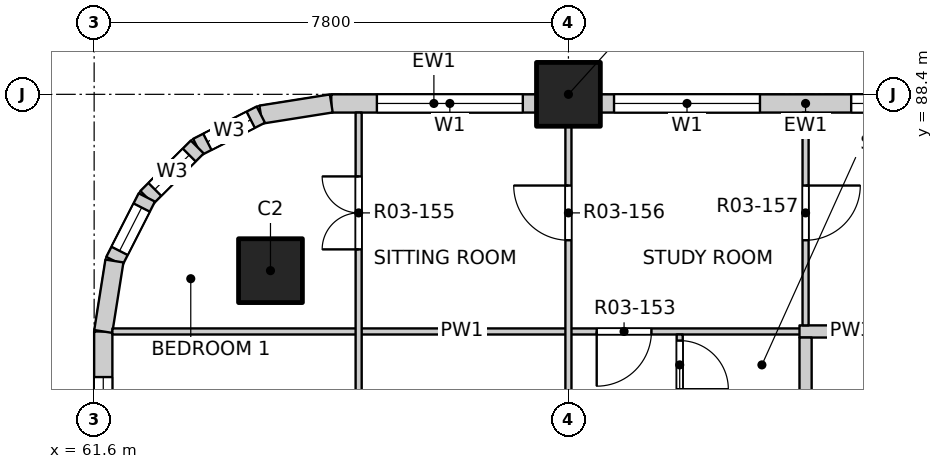
"""IFC4 building model, lengths in metres.
Left out: names, types, materials, properties, quantities, classifications, styles, units other than length and angle.
Written with IfcOpenShell. Run it as: python <this file> out.ifc"""

import sys

from ifc_helpers import new_model, si_unit, direction, frame, frame_2d, origin, origin_2d, place, context, subcontext, project, spatial, rectangle, extrude, element, fill, save


model = new_model("IFC4")
c1 = context("Model", 3, precision=1e-05, world=origin(), true_north=direction((0.0, 1.0)))
c2 = subcontext(c1, "Body", "Model", "MODEL_VIEW")
j1 = project(units=[si_unit("LENGTHUNIT", "METRE"), si_unit("PLANEANGLEUNIT", "RADIAN")], contexts=[c1])
p1 = place(None, origin())
s1 = spatial("IfcSite", under=j1, at=p1, CompositionType="ELEMENT")
p2 = place(p1, origin())
s2 = spatial("IfcBuilding", under=s1, at=p2, CompositionType="ELEMENT")
p3 = place(p2, frame((0.0, 0.0, 39.9)))
s3 = spatial("IfcBuildingStorey", under=s2, at=p3, CompositionType="ELEMENT", Elevation=39.9)
for number, where, z_axis, x_axis in (
    (1, (64.5, 85.5, -0.25), (0.0, 0.0, 1.0), (1.0, 0.0, 0.0)),
    (2, (69.4, 88.4, -0.25), (0.0, 0.0, 1.0), (1.0, 0.0, 0.0)),
):
    element("IfcColumn", number, at=place(p3, frame(where, z_axis=z_axis, x_axis=x_axis)), inside=s3, PredefinedType="COLUMN", context=c2, shape_type="SweptSolid", body=[
        extrude(rectangle(XDim=1.05, YDim=1.05, at=origin_2d()), origin(), (0.0, 0.0, 1.0), 3.4),
    ])
p4 = place(p3, frame((65.5, 88.25, 0.0), z_axis=(0.0, 0.0, 1.0), x_axis=(1.0, 0.0, 0.0)))
e3 = element("IfcWall", 3, at=p4, inside=s3, PredefinedType="SOLIDWALL", context=c2, shape_type="SweptSolid", body=[
    extrude(rectangle(XDim=3.375, YDim=0.3, at=frame_2d((1.688, 0.0))), origin(), (0.0, 0.0, 1.0), 2.7),
])
p5 = place(p4, frame((0.75, 0.0, 0.9)))
e4 = element("IfcOpeningElement", 4, at=p5, cuts=e3, PredefinedType="OPENING", context=c2, shape_type="SweptSolid", body=[
    extrude(rectangle(XDim=2.4, YDim=1.8, at=frame_2d((1.2, 0.9))), frame((0.0, 0.16, 0.0), z_axis=(0.0, -1.0, 0.0), x_axis=(1.0, 0.0, 0.0)), (0.0, 0.0, 1.0), 0.32),
])
p6 = place(p3, frame((69.925, 88.25, 0.0), z_axis=(0.0, 0.0, 1.0), x_axis=(1.0, 0.0, 0.0)))
e5 = element("IfcWall", 5, at=p6, inside=s3, PredefinedType="SOLIDWALL", context=c2, shape_type="SweptSolid", body=[
    extrude(rectangle(XDim=6.75, YDim=0.3, at=frame_2d((3.375, 0.0))), origin(), (0.0, 0.0, 1.0), 2.7),
])
p7 = place(p6, frame((0.225, 0.0, 0.9)))
e6 = element("IfcOpeningElement", 6, at=p7, cuts=e5, PredefinedType="OPENING", context=c2, shape_type="SweptSolid", body=[
    extrude(rectangle(XDim=2.4, YDim=1.8, at=frame_2d((1.2, 0.9))), frame((0.0, 0.16, 0.0), z_axis=(0.0, -1.0, 0.0), x_axis=(1.0, 0.0, 0.0)), (0.0, 0.0, 1.0), 0.32),
])
p8 = place(p6, frame((4.125, 0.0, 0.9)))
e7 = element("IfcOpeningElement", 7, at=p8, cuts=e5, PredefinedType="OPENING", context=c2, shape_type="SweptSolid", body=[
    extrude(rectangle(XDim=2.4, YDim=1.8, at=frame_2d((1.2, 0.9))), frame((0.0, 0.16, 0.0), z_axis=(0.0, -1.0, 0.0), x_axis=(1.0, 0.0, 0.0)), (0.0, 0.0, 1.0), 0.32),
])
p9 = place(p3, frame((61.75, 81.125, 0.0), z_axis=(0.0, 0.0, 1.0), x_axis=(0.0, 1.0, 0.0)))
e8 = element("IfcWall", 8, at=p9, inside=s3, PredefinedType="SOLIDWALL", context=c2, shape_type="SweptSolid", body=[
    extrude(rectangle(XDim=3.375, YDim=0.3, at=frame_2d((1.688, 0.0))), origin(), (0.0, 0.0, 1.0), 2.7),
])
p10 = place(p9, frame((0.225, 0.0, 0.9)))
e9 = element("IfcOpeningElement", 9, at=p10, cuts=e8, PredefinedType="OPENING", context=c2, shape_type="SweptSolid", body=[
    extrude(rectangle(XDim=2.4, YDim=1.8, at=frame_2d((1.2, 0.9))), frame((0.0, 0.16, 0.0), z_axis=(0.0, -1.0, 0.0), x_axis=(1.0, 0.0, 0.0)), (0.0, 0.0, 1.0), 0.32),
])
p11 = place(p3, frame((65.5, 88.25, 0.0), z_axis=(0.0, 0.0, 1.0), x_axis=(-0.987678452879, -0.156496880861, 0.0)))
e10 = element("IfcWall", 10, at=p11, inside=s3, PredefinedType="SOLIDWALL", context=c2, shape_type="SweptSolid", body=[
    extrude(rectangle(XDim=1.173, YDim=0.3, at=frame_2d((0.586, 0.0))), origin(), (0.0, 0.0, 1.0), 2.7),
])
p12 = place(p3, frame((64.341, 88.066, 0.0), z_axis=(0.0, 0.0, 1.0), x_axis=(-0.890988677504, -0.454025524128, 0.0)))
e11 = element("IfcWall", 11, at=p12, inside=s3, PredefinedType="SOLIDWALL", context=c2, shape_type="SweptSolid", body=[
    extrude(rectangle(XDim=1.173, YDim=0.3, at=frame_2d((0.587, 0.0))), origin(), (0.0, 0.0, 1.0), 2.7),
])
p13 = place(p12, frame((0.187, 0.0, 0.9)))
e12 = element("IfcOpeningElement", 12, at=p13, cuts=e11, PredefinedType="OPENING", context=c2, shape_type="SweptSolid", body=[
    extrude(rectangle(XDim=0.8, YDim=1.2, at=frame_2d((0.4, 0.6))), frame((0.0, 0.16, 0.0), z_axis=(0.0, -1.0, 0.0), x_axis=(1.0, 0.0, 0.0)), (0.0, 0.0, 1.0), 0.32),
])
p14 = place(p3, frame((63.296, 87.534, 0.0), z_axis=(0.0, 0.0, 1.0), x_axis=(-0.707106781187, -0.707106781187, 0.0)))
e13 = element("IfcWall", 13, at=p14, inside=s3, PredefinedType="SOLIDWALL", context=c2, shape_type="SweptSolid", body=[
    extrude(rectangle(XDim=1.173, YDim=0.3, at=frame_2d((0.586, 0.0))), origin(), (0.0, 0.0, 1.0), 2.7),
])
p15 = place(p14, frame((0.187, 0.0, 0.9)))
e14 = element("IfcOpeningElement", 14, at=p15, cuts=e13, PredefinedType="OPENING", context=c2, shape_type="SweptSolid", body=[
    extrude(rectangle(XDim=0.8, YDim=1.2, at=frame_2d((0.4, 0.6))), frame((0.0, 0.16, 0.0), z_axis=(0.0, -1.0, 0.0), x_axis=(1.0, 0.0, 0.0)), (0.0, 0.0, 1.0), 0.32),
])
p16 = place(p3, frame((62.466, 86.704, 0.0), z_axis=(0.0, 0.0, 1.0), x_axis=(-0.454025524128, -0.890988677504, 0.0)))
e15 = element("IfcWall", 15, at=p16, inside=s3, PredefinedType="SOLIDWALL", context=c2, shape_type="SweptSolid", body=[
    extrude(rectangle(XDim=1.173, YDim=0.3, at=frame_2d((0.587, 0.0))), origin(), (0.0, 0.0, 1.0), 2.7),
])
p17 = place(p16, frame((0.187, 0.0, 0.9)))
e16 = element("IfcOpeningElement", 16, at=p17, cuts=e15, PredefinedType="OPENING", context=c2, shape_type="SweptSolid", body=[
    extrude(rectangle(XDim=0.8, YDim=1.2, at=frame_2d((0.4, 0.6))), frame((0.0, 0.16, 0.0), z_axis=(0.0, -1.0, 0.0), x_axis=(1.0, 0.0, 0.0)), (0.0, 0.0, 1.0), 0.32),
])
p18 = place(p3, frame((61.934, 85.659, 0.0), z_axis=(0.0, 0.0, 1.0), x_axis=(-0.156496880861, -0.987678452879, 0.0)))
e17 = element("IfcWall", 17, at=p18, inside=s3, PredefinedType="SOLIDWALL", context=c2, shape_type="SweptSolid", body=[
    extrude(rectangle(XDim=1.173, YDim=0.3, at=frame_2d((0.586, 0.0))), origin(), (0.0, 0.0, 1.0), 2.7),
])
p19 = place(p3, frame((61.9, 84.5, 0.0), z_axis=(0.0, 0.0, 1.0), x_axis=(1.0, 0.0, 0.0)))
e18 = element("IfcWall", 18, at=p19, inside=s3, PredefinedType="PARTITIONING", context=c2, shape_type="SweptSolid", body=[
    extrude(rectangle(XDim=11.5, YDim=0.1, at=frame_2d((5.75, 0.0))), origin(), (0.0, 0.0, 1.0), 3.15),
])
p20 = place(p19, frame((7.965, 0.0, 0.0)))
e19 = element("IfcOpeningElement", 19, at=p20, cuts=e18, PredefinedType="OPENING", context=c2, shape_type="SweptSolid", body=[
    extrude(rectangle(XDim=0.9, YDim=2.1, at=frame_2d((0.45, 1.05))), frame((0.0, 0.06, 0.0), z_axis=(0.0, -1.0, 0.0), x_axis=(1.0, 0.0, 0.0)), (0.0, 0.0, 1.0), 0.12),
])
p21 = place(p3, frame((73.2, 84.5, 0.0), z_axis=(0.0, 0.0, 1.0), x_axis=(1.0, 0.0, 0.0)))
e20 = element("IfcWall", 20, at=p21, inside=s3, PredefinedType="PARTITIONING", context=c2, shape_type="SweptSolid", body=[
    extrude(rectangle(XDim=1.7, YDim=0.2, at=frame_2d((0.85, 0.0))), origin(), (0.0, 0.0, 1.0), 3.15),
])
p22 = place(p3, frame((65.95, 76.8, 0.0), z_axis=(0.0, 0.0, 1.0), x_axis=(0.0, 1.0, 0.0)))
e21 = element("IfcWall", 21, at=p22, inside=s3, PredefinedType="PARTITIONING", context=c2, shape_type="SweptSolid", body=[
    extrude(rectangle(XDim=11.3, YDim=0.1, at=frame_2d((5.65, 0.0))), origin(), (0.0, 0.0, 1.0), 3.15),
])
p23 = place(p22, frame((1.25, 0.0, 0.0)))
e22 = element("IfcOpeningElement", 22, at=p23, cuts=e21, PredefinedType="OPENING", context=c2, shape_type="SweptSolid", body=[
    extrude(rectangle(XDim=1.2, YDim=2.1, at=frame_2d((0.6, 1.05))), frame((0.0, 0.06, 0.0), z_axis=(0.0, -1.0, 0.0), x_axis=(1.0, 0.0, 0.0)), (0.0, 0.0, 1.0), 0.12),
])
p24 = place(p22, frame((5.15, 0.0, 0.0)))
e23 = element("IfcOpeningElement", 23, at=p24, cuts=e21, PredefinedType="OPENING", context=c2, shape_type="SweptSolid", body=[
    extrude(rectangle(XDim=1.2, YDim=2.1, at=frame_2d((0.6, 1.05))), frame((0.0, 0.06, 0.0), z_axis=(0.0, -1.0, 0.0), x_axis=(1.0, 0.0, 0.0)), (0.0, 0.0, 1.0), 0.12),
])
p25 = place(p22, frame((9.05, 0.0, 0.0)))
e24 = element("IfcOpeningElement", 24, at=p25, cuts=e21, PredefinedType="OPENING", context=c2, shape_type="SweptSolid", body=[
    extrude(rectangle(XDim=1.2, YDim=2.1, at=frame_2d((0.6, 1.05))), frame((0.0, 0.06, 0.0), z_axis=(0.0, -1.0, 0.0), x_axis=(1.0, 0.0, 0.0)), (0.0, 0.0, 1.0), 0.12),
])
p26 = place(p3, frame((69.4, 41.9, 0.0), z_axis=(0.0, 0.0, 1.0), x_axis=(0.0, 1.0, 0.0)))
e25 = element("IfcWall", 25, at=p26, inside=s3, PredefinedType="PARTITIONING", context=c2, shape_type="SweptSolid", body=[
    extrude(rectangle(XDim=46.2, YDim=0.1, at=frame_2d((23.1, 0.0))), origin(), (0.0, 0.0, 1.0), 3.15),
])
p27 = place(p26, frame((1.2, 0.0, 0.0)))
e26 = element("IfcOpeningElement", 26, at=p27, cuts=e25, PredefinedType="OPENING", context=c2, shape_type="SweptSolid", body=[
    extrude(rectangle(XDim=0.9, YDim=2.1, at=frame_2d((0.45, 1.05))), frame((0.0, 0.06, 0.0), z_axis=(0.0, -1.0, 0.0), x_axis=(1.0, 0.0, 0.0)), (0.0, 0.0, 1.0), 0.12),
])
p28 = place(p26, frame((5.9, 0.0, 0.0)))
e27 = element("IfcOpeningElement", 27, at=p28, cuts=e25, PredefinedType="OPENING", context=c2, shape_type="SweptSolid", body=[
    extrude(rectangle(XDim=0.9, YDim=2.1, at=frame_2d((0.45, 1.05))), frame((0.0, 0.06, 0.0), z_axis=(0.0, -1.0, 0.0), x_axis=(1.0, 0.0, 0.0)), (0.0, 0.0, 1.0), 0.12),
])
p29 = place(p26, frame((9.0, 0.0, 0.0)))
e28 = element("IfcOpeningElement", 28, at=p29, cuts=e25, PredefinedType="OPENING", context=c2, shape_type="SweptSolid", body=[
    extrude(rectangle(XDim=0.9, YDim=2.1, at=frame_2d((0.45, 1.05))), frame((0.0, 0.06, 0.0), z_axis=(0.0, -1.0, 0.0), x_axis=(1.0, 0.0, 0.0)), (0.0, 0.0, 1.0), 0.12),
])
p30 = place(p26, frame((13.725, 0.0, 0.0)))
e29 = element("IfcOpeningElement", 29, at=p30, cuts=e25, PredefinedType="OPENING", context=c2, shape_type="SweptSolid", body=[
    extrude(rectangle(XDim=0.9, YDim=2.1, at=frame_2d((0.45, 1.05))), frame((0.0, 0.06, 0.0), z_axis=(0.0, -1.0, 0.0), x_axis=(1.0, 0.0, 0.0)), (0.0, 0.0, 1.0), 0.12),
])
p31 = place(p26, frame((17.775, 0.0, 0.0)))
e30 = element("IfcOpeningElement", 30, at=p31, cuts=e25, PredefinedType="OPENING", context=c2, shape_type="SweptSolid", body=[
    extrude(rectangle(XDim=0.9, YDim=2.1, at=frame_2d((0.45, 1.05))), frame((0.0, 0.06, 0.0), z_axis=(0.0, -1.0, 0.0), x_axis=(1.0, 0.0, 0.0)), (0.0, 0.0, 1.0), 0.12),
])
p32 = place(p26, frame((20.7, 0.0, 0.0)))
e31 = element("IfcOpeningElement", 31, at=p32, cuts=e25, PredefinedType="OPENING", context=c2, shape_type="SweptSolid", body=[
    extrude(rectangle(XDim=0.9, YDim=2.1, at=frame_2d((0.45, 1.05))), frame((0.0, 0.06, 0.0), z_axis=(0.0, -1.0, 0.0), x_axis=(1.0, 0.0, 0.0)), (0.0, 0.0, 1.0), 0.12),
])
p33 = place(p26, frame((25.575, 0.0, 0.0)))
e32 = element("IfcOpeningElement", 32, at=p33, cuts=e25, PredefinedType="OPENING", context=c2, shape_type="SweptSolid", body=[
    extrude(rectangle(XDim=0.9, YDim=2.1, at=frame_2d((0.45, 1.05))), frame((0.0, 0.06, 0.0), z_axis=(0.0, -1.0, 0.0), x_axis=(1.0, 0.0, 0.0)), (0.0, 0.0, 1.0), 0.12),
])
p34 = place(p26, frame((28.5, 0.0, 0.0)))
e33 = element("IfcOpeningElement", 33, at=p34, cuts=e25, PredefinedType="OPENING", context=c2, shape_type="SweptSolid", body=[
    extrude(rectangle(XDim=0.9, YDim=2.1, at=frame_2d((0.45, 1.05))), frame((0.0, 0.06, 0.0), z_axis=(0.0, -1.0, 0.0), x_axis=(1.0, 0.0, 0.0)), (0.0, 0.0, 1.0), 0.12),
])
p35 = place(p26, frame((33.375, 0.0, 0.0)))
e34 = element("IfcOpeningElement", 34, at=p35, cuts=e25, PredefinedType="OPENING", context=c2, shape_type="SweptSolid", body=[
    extrude(rectangle(XDim=0.9, YDim=2.1, at=frame_2d((0.45, 1.05))), frame((0.0, 0.06, 0.0), z_axis=(0.0, -1.0, 0.0), x_axis=(1.0, 0.0, 0.0)), (0.0, 0.0, 1.0), 0.12),
])
p36 = place(p26, frame((36.3, 0.0, 0.0)))
e35 = element("IfcOpeningElement", 35, at=p36, cuts=e25, PredefinedType="OPENING", context=c2, shape_type="SweptSolid", body=[
    extrude(rectangle(XDim=0.9, YDim=2.1, at=frame_2d((0.45, 1.05))), frame((0.0, 0.06, 0.0), z_axis=(0.0, -1.0, 0.0), x_axis=(1.0, 0.0, 0.0)), (0.0, 0.0, 1.0), 0.12),
])
p37 = place(p26, frame((40.2, 0.0, 0.0)))
e36 = element("IfcOpeningElement", 36, at=p37, cuts=e25, PredefinedType="OPENING", context=c2, shape_type="SweptSolid", body=[
    extrude(rectangle(XDim=0.9, YDim=2.1, at=frame_2d((0.45, 1.05))), frame((0.0, 0.06, 0.0), z_axis=(0.0, -1.0, 0.0), x_axis=(1.0, 0.0, 0.0)), (0.0, 0.0, 1.0), 0.12),
])
p38 = place(p26, frame((44.1, 0.0, 0.0)))
e37 = element("IfcOpeningElement", 37, at=p38, cuts=e25, PredefinedType="OPENING", context=c2, shape_type="SweptSolid", body=[
    extrude(rectangle(XDim=0.9, YDim=2.1, at=frame_2d((0.45, 1.05))), frame((0.0, 0.06, 0.0), z_axis=(0.0, -1.0, 0.0), x_axis=(1.0, 0.0, 0.0)), (0.0, 0.0, 1.0), 0.12),
])
p39 = place(p3, frame((71.23, 83.45, 0.0), z_axis=(0.0, 0.0, 1.0), x_axis=(0.0, 1.0, 0.0)))
e38 = element("IfcWall", 38, at=p39, inside=s3, PredefinedType="PARTITIONING", context=c2, shape_type="SweptSolid", body=[
    extrude(rectangle(XDim=1.0, YDim=0.1, at=frame_2d((0.5, 0.0))), origin(), (0.0, 0.0, 1.0), 3.15),
])
p40 = place(p39, frame((0.1, 0.0, 0.0)))
e39 = element("IfcOpeningElement", 39, at=p40, cuts=e38, PredefinedType="OPENING", context=c2, shape_type="SweptSolid", body=[
    extrude(rectangle(XDim=0.8, YDim=2.1, at=frame_2d((0.4, 1.05))), frame((0.0, 0.06, 0.0), z_axis=(0.0, -1.0, 0.0), x_axis=(1.0, 0.0, 0.0)), (0.0, 0.0, 1.0), 0.12),
])
p41 = place(p3, frame((73.3, 53.4, 0.0), z_axis=(0.0, 0.0, 1.0), x_axis=(0.0, 1.0, 0.0)))
e40 = element("IfcWall", 40, at=p41, inside=s3, PredefinedType="PARTITIONING", context=c2, shape_type="SweptSolid", body=[
    extrude(rectangle(XDim=31.0, YDim=0.2, at=frame_2d((15.5, 0.0))), origin(), (0.0, 0.0, 1.0), 3.15),
])
p42 = place(p41, frame((5.775, 0.0, 0.0)))
e41 = element("IfcOpeningElement", 41, at=p42, cuts=e40, PredefinedType="OPENING", context=c2, shape_type="SweptSolid", body=[
    extrude(rectangle(XDim=1.0, YDim=2.1, at=frame_2d((0.5, 1.05))), frame((0.0, 0.11, 0.0), z_axis=(0.0, -1.0, 0.0), x_axis=(1.0, 0.0, 0.0)), (0.0, 0.0, 1.0), 0.22),
])
p43 = place(p41, frame((10.875, 0.0, 0.0)))
e42 = element("IfcOpeningElement", 42, at=p43, cuts=e40, PredefinedType="OPENING", context=c2, shape_type="SweptSolid", body=[
    extrude(rectangle(XDim=1.0, YDim=2.1, at=frame_2d((0.5, 1.05))), frame((0.0, 0.11, 0.0), z_axis=(0.0, -1.0, 0.0), x_axis=(1.0, 0.0, 0.0)), (0.0, 0.0, 1.0), 0.22),
])
p44 = place(p41, frame((18.025, 0.0, 0.0)))
e43 = element("IfcOpeningElement", 43, at=p44, cuts=e40, PredefinedType="OPENING", context=c2, shape_type="SweptSolid", body=[
    extrude(rectangle(XDim=1.0, YDim=2.1, at=frame_2d((0.5, 1.05))), frame((0.0, 0.11, 0.0), z_axis=(0.0, -1.0, 0.0), x_axis=(1.0, 0.0, 0.0)), (0.0, 0.0, 1.0), 0.22),
])
p45 = place(p41, frame((27.725, 0.0, 0.0)))
e44 = element("IfcOpeningElement", 44, at=p45, cuts=e40, PredefinedType="OPENING", context=c2, shape_type="SweptSolid", body=[
    extrude(rectangle(XDim=1.0, YDim=2.1, at=frame_2d((0.5, 1.05))), frame((0.0, 0.11, 0.0), z_axis=(0.0, -1.0, 0.0), x_axis=(1.0, 0.0, 0.0)), (0.0, 0.0, 1.0), 0.22),
])
p46 = place(p3, frame((73.3, 84.6, 0.0), z_axis=(0.0, 0.0, 1.0), x_axis=(0.0, 1.0, 0.0)))
e45 = element("IfcWall", 45, at=p46, inside=s3, PredefinedType="PARTITIONING", context=c2, shape_type="SweptSolid", body=[
    extrude(rectangle(XDim=3.5, YDim=0.1, at=frame_2d((1.75, 0.0))), origin(), (0.0, 0.0, 1.0), 3.15),
])
p47 = place(p46, frame((1.4, 0.0, 0.0)))
e46 = element("IfcOpeningElement", 46, at=p47, cuts=e45, PredefinedType="OPENING", context=c2, shape_type="SweptSolid", body=[
    extrude(rectangle(XDim=0.9, YDim=2.1, at=frame_2d((0.45, 1.05))), frame((0.0, 0.06, 0.0), z_axis=(0.0, -1.0, 0.0), x_axis=(1.0, 0.0, 0.0)), (0.0, 0.0, 1.0), 0.12),
])
p48 = place(p5, origin())
e47 = element("IfcWindow", 47, at=p48, inside=s3, PartitioningType="DOUBLE_PANEL_VERTICAL", PredefinedType="WINDOW", context=c2, shape_type="SweptSolid", body=[
    extrude(rectangle(XDim=2.4, YDim=1.8, at=frame_2d((1.2, 0.9))), frame((0.0, 0.03, 0.0), z_axis=(0.0, -1.0, 0.0), x_axis=(1.0, 0.0, 0.0)), (0.0, 0.0, 1.0), 0.06),
])
fill(e4, e47)
p49 = place(p7, origin())
e48 = element("IfcWindow", 48, at=p49, inside=s3, PartitioningType="DOUBLE_PANEL_VERTICAL", PredefinedType="WINDOW", context=c2, shape_type="SweptSolid", body=[
    extrude(rectangle(XDim=2.4, YDim=1.8, at=frame_2d((1.2, 0.9))), frame((0.0, 0.03, 0.0), z_axis=(0.0, -1.0, 0.0), x_axis=(1.0, 0.0, 0.0)), (0.0, 0.0, 1.0), 0.06),
])
fill(e6, e48)
p50 = place(p8, origin())
e49 = element("IfcWindow", 49, at=p50, inside=s3, PartitioningType="DOUBLE_PANEL_VERTICAL", PredefinedType="WINDOW", context=c2, shape_type="SweptSolid", body=[
    extrude(rectangle(XDim=2.4, YDim=1.8, at=frame_2d((1.2, 0.9))), frame((0.0, 0.03, 0.0), z_axis=(0.0, -1.0, 0.0), x_axis=(1.0, 0.0, 0.0)), (0.0, 0.0, 1.0), 0.06),
])
fill(e7, e49)
p51 = place(p10, origin())
e50 = element("IfcWindow", 50, at=p51, inside=s3, PartitioningType="DOUBLE_PANEL_VERTICAL", PredefinedType="WINDOW", context=c2, shape_type="SweptSolid", body=[
    extrude(rectangle(XDim=2.4, YDim=1.8, at=frame_2d((1.2, 0.9))), frame((0.0, 0.03, 0.0), z_axis=(0.0, -1.0, 0.0), x_axis=(1.0, 0.0, 0.0)), (0.0, 0.0, 1.0), 0.06),
])
fill(e9, e50)
p52 = place(p13, origin())
e51 = element("IfcWindow", 51, at=p52, inside=s3, PartitioningType="SINGLE_PANEL", PredefinedType="WINDOW", context=c2, shape_type="SweptSolid", body=[
    extrude(rectangle(XDim=0.8, YDim=1.2, at=frame_2d((0.4, 0.6))), frame((0.0, 0.03, 0.0), z_axis=(0.0, -1.0, 0.0), x_axis=(1.0, 0.0, 0.0)), (0.0, 0.0, 1.0), 0.06),
])
fill(e12, e51)
p53 = place(p15, origin())
e52 = element("IfcWindow", 52, at=p53, inside=s3, PartitioningType="SINGLE_PANEL", PredefinedType="WINDOW", context=c2, shape_type="SweptSolid", body=[
    extrude(rectangle(XDim=0.8, YDim=1.2, at=frame_2d((0.4, 0.6))), frame((0.0, 0.03, 0.0), z_axis=(0.0, -1.0, 0.0), x_axis=(1.0, 0.0, 0.0)), (0.0, 0.0, 1.0), 0.06),
])
fill(e14, e52)
p54 = place(p17, origin())
e53 = element("IfcWindow", 53, at=p54, inside=s3, PartitioningType="SINGLE_PANEL", PredefinedType="WINDOW", context=c2, shape_type="SweptSolid", body=[
    extrude(rectangle(XDim=0.8, YDim=1.2, at=frame_2d((0.4, 0.6))), frame((0.0, 0.03, 0.0), z_axis=(0.0, -1.0, 0.0), x_axis=(1.0, 0.0, 0.0)), (0.0, 0.0, 1.0), 0.06),
])
fill(e16, e53)
p55 = place(p40, origin())
e54 = element("IfcDoor", 54, at=p55, inside=s3, OperationType="SINGLE_SWING_RIGHT", PredefinedType="DOOR", context=c2, shape_type="SweptSolid", body=[
    extrude(rectangle(XDim=0.8, YDim=2.1, at=frame_2d((0.4, 1.05))), frame((0.0, 0.025, 0.0), z_axis=(0.0, -1.0, 0.0), x_axis=(1.0, 0.0, 0.0)), (0.0, 0.0, 1.0), 0.05),
])
fill(e39, e54)
p56 = place(p20, origin())
e55 = element("IfcDoor", 55, at=p56, inside=s3, OperationType="SINGLE_SWING_RIGHT", PredefinedType="DOOR", context=c2, shape_type="SweptSolid", body=[
    extrude(rectangle(XDim=0.9, YDim=2.1, at=frame_2d((0.45, 1.05))), frame((0.0, 0.025, 0.0), z_axis=(0.0, -1.0, 0.0), x_axis=(1.0, 0.0, 0.0)), (0.0, 0.0, 1.0), 0.05),
])
fill(e19, e55)
p57 = place(p25, origin())
e56 = element("IfcDoor", 56, at=p57, inside=s3, OperationType="DOUBLE_DOOR_SINGLE_SWING", PredefinedType="DOOR", context=c2, shape_type="SweptSolid", body=[
    extrude(rectangle(XDim=1.2, YDim=2.1, at=frame_2d((0.6, 1.05))), frame((0.0, 0.025, 0.0), z_axis=(0.0, -1.0, 0.0), x_axis=(1.0, 0.0, 0.0)), (0.0, 0.0, 1.0), 0.05),
])
fill(e24, e56)
p58 = place(p38, origin())
e57 = element("IfcDoor", 57, at=p58, inside=s3, OperationType="SINGLE_SWING_RIGHT", PredefinedType="DOOR", context=c2, shape_type="SweptSolid", body=[
    extrude(rectangle(XDim=0.9, YDim=2.1, at=frame_2d((0.45, 1.05))), frame((0.0, 0.025, 0.0), z_axis=(0.0, -1.0, 0.0), x_axis=(1.0, 0.0, 0.0)), (0.0, 0.0, 1.0), 0.05),
])
fill(e37, e57)
p59 = place(p47, origin())
e58 = element("IfcDoor", 58, at=p59, inside=s3, OperationType="SINGLE_SWING_LEFT", PredefinedType="DOOR", context=c2, shape_type="SweptSolid", body=[
    extrude(rectangle(XDim=0.9, YDim=2.1, at=frame_2d((0.45, 1.05))), frame((0.0, 0.025, 0.0), z_axis=(0.0, -1.0, 0.0), x_axis=(1.0, 0.0, 0.0)), (0.0, 0.0, 1.0), 0.05),
])
fill(e46, e58)
save(model, sys.argv[1])
